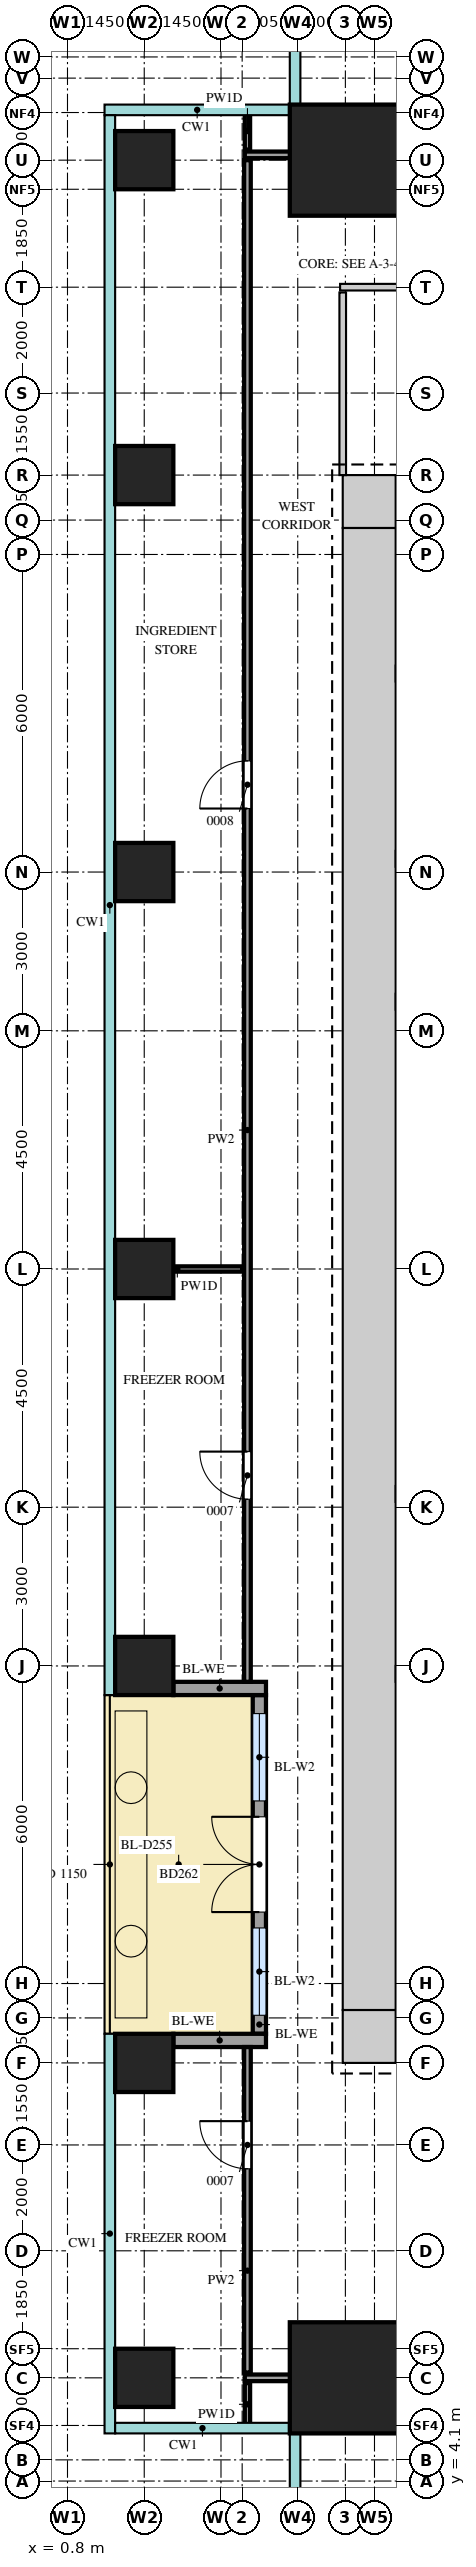
"""IFC4 building model, lengths in metres.
Left out: names, types, materials, properties, quantities, classifications, styles, units other than length and angle.
Written with IfcOpenShell. Run it as: python <this file> out.ifc"""

import sys

from ifc_helpers import new_model, si_unit, direction, frame, frame_2d, origin, origin_2d, place, context, subcontext, project, spatial, rectangle, extrude, source, transform, mapped, element, fill, save


model = new_model("IFC4")
c1 = context("Model", 3, precision=1e-05, world=origin(), true_north=direction((0.0, 1.0)))
c2 = subcontext(c1, "Body", "Model", "MODEL_VIEW")
j1 = project(units=[si_unit("LENGTHUNIT", "METRE"), si_unit("PLANEANGLEUNIT", "RADIAN")], contexts=[c1])
p1 = place(None, origin())
s1 = spatial("IfcSite", under=j1, at=p1, CompositionType="ELEMENT")
p2 = place(p1, origin())
s2 = spatial("IfcBuilding", under=s1, at=p2, CompositionType="ELEMENT")
p3 = place(p2, frame((0.0, 0.0, 123.5)))
s3 = spatial("IfcBuildingStorey", under=s2, at=p3, CompositionType="ELEMENT", Elevation=123.5)
m1 = source(origin(), c2, "Body", "SweptSolid", [
    extrude(rectangle(XDim=1.0, YDim=1.0, at=frame_2d((0.5, 0.0))), origin(), (0.0, 0.0, 1.0), 4.1),
])
for number, where, z_axis, x_axis in (
    (1, (6.0, 41.5, 0.0), (0.0, 0.0, 1.0), (1.0, 0.0, 0.0)),
    (2, (6.0, 12.5, 0.0), (0.0, 0.0, 1.0), (1.0, 0.0, 0.0)),
):
    element("IfcWall", number, at=place(p3, frame(where, z_axis=z_axis, x_axis=x_axis)), inside=s3, PredefinedType="SHEAR", context=c2, shape_type="MappedRepresentation", body=[
        mapped(m1, transform((0.0, 0.0, 0.0))),
    ])
m2 = source(origin(), c2, "Body", "SweptSolid", [
    extrude(rectangle(XDim=28.0, YDim=1.0, at=frame_2d((14.0, 0.0))), origin(), (0.0, 0.0, 1.0), 4.1),
])
p4 = place(p3, frame((6.5, 13.0, 0.0), z_axis=(0.0, 0.0, 1.0), x_axis=(0.0, 1.0, 0.0)))
e3 = element("IfcWall", 3, at=p4, inside=s3, PredefinedType="SHEAR", context=c2, shape_type="MappedRepresentation", body=[
    mapped(m2, transform((0.0, 0.0, 0.0))),
])
m3 = source(origin(), c2, "Body", "SweptSolid", [
    extrude(rectangle(XDim=2.1, YDim=2.1, at=origin_2d()), origin(), (0.0, 0.0, 1.0), 4.4),
])
for number, where, z_axis, x_axis in (
    (4, (6.05, 47.95, 0.0), (0.0, 0.0, 1.0), (1.0, 0.0, 0.0)),
    (5, (6.05, 6.05, 0.0), (0.0, 0.0, 1.0), (1.0, 0.0, 0.0)),
):
    element("IfcColumn", number, at=place(p3, frame(where, z_axis=z_axis, x_axis=x_axis)), inside=s3, PredefinedType="COLUMN", context=c2, shape_type="MappedRepresentation", body=[
        mapped(m3, transform((0.0, 0.0, 0.0))),
    ])
m4 = source(origin(), c2, "Body", "SweptSolid", [
    extrude(rectangle(XDim=1.1, YDim=1.1, at=origin_2d()), origin(), (0.0, 0.0, 1.0), 4.1),
])
for number, where, z_axis, x_axis in (
    (6, (2.25, 6.05, 0.0), (0.0, 0.0, 1.0), (1.0, 0.0, 0.0)),
    (7, (2.25, 12.0, 0.0), (0.0, 0.0, 1.0), (1.0, 0.0, 0.0)),
    (8, (2.25, 19.5, 0.0), (0.0, 0.0, 1.0), (1.0, 0.0, 0.0)),
    (9, (2.25, 27.0, 0.0), (0.0, 0.0, 1.0), (1.0, 0.0, 0.0)),
    (10, (2.25, 34.5, 0.0), (0.0, 0.0, 1.0), (1.0, 0.0, 0.0)),
    (11, (2.25, 42.0, 0.0), (0.0, 0.0, 1.0), (1.0, 0.0, 0.0)),
    (12, (2.25, 47.95, 0.0), (0.0, 0.0, 1.0), (1.0, 0.0, 0.0)),
):
    element("IfcColumn", number, at=place(p3, frame(where, z_axis=z_axis, x_axis=x_axis)), inside=s3, PredefinedType="COLUMN", context=c2, shape_type="MappedRepresentation", body=[
        mapped(m4, transform((0.0, 0.0, 0.0))),
    ])
m5 = source(origin(), c2, "Body", "SweptSolid", [
    extrude(rectangle(XDim=6.4, YDim=0.25, at=frame_2d((3.2, 0.0))), origin(), (0.0, 0.0, 1.0), 3.5),
])
p5 = place(p3, frame((4.425, 12.55, 0.0), z_axis=(0.0, 0.0, 1.0), x_axis=(0.0, 1.0, 0.0)))
e13 = element("IfcWall", 13, at=p5, inside=s3, PredefinedType="SOLIDWALL", context=c2, shape_type="MappedRepresentation", body=[
    mapped(m5, transform((0.0, 0.0, 0.0))),
])
m6 = source(origin(), c2, "Body", "SweptSolid", [
    extrude(rectangle(XDim=1.65, YDim=2.4, at=frame_2d((0.825, 1.2))), frame((0.0, 0.135, 0.0), z_axis=(0.0, -1.0, 0.0), x_axis=(1.0, 0.0, 0.0)), (0.0, 0.0, 1.0), 0.27),
])
p6 = place(p5, frame((0.35, 0.0, 0.0)))
e14 = element("IfcOpeningElement", 14, at=p6, cuts=e13, PredefinedType="OPENING", context=c2, shape_type="MappedRepresentation", body=[
    mapped(m6, transform((0.0, 0.0, 0.0))),
])
p7 = place(p5, frame((4.4, 0.0, 0.0)))
e15 = element("IfcOpeningElement", 15, at=p7, cuts=e13, PredefinedType="OPENING", context=c2, shape_type="MappedRepresentation", body=[
    mapped(m6, transform((0.0, 0.0, 0.0))),
])
m7 = source(origin(), c2, "Body", "SweptSolid", [
    extrude(rectangle(XDim=1.8, YDim=2.4, at=frame_2d((0.9, 1.2))), frame((0.0, 0.135, 0.0), z_axis=(0.0, -1.0, 0.0), x_axis=(1.0, 0.0, 0.0)), (0.0, 0.0, 1.0), 0.27),
])
p8 = place(p5, frame((2.3, 0.0, 0.0)))
e16 = element("IfcOpeningElement", 16, at=p8, cuts=e13, PredefinedType="OPENING", context=c2, shape_type="MappedRepresentation", body=[
    mapped(m7, transform((0.0, 0.0, 0.0))),
])
m8 = source(origin(), c2, "Body", "SweptSolid", [
    extrude(rectangle(XDim=1.75, YDim=0.25, at=frame_2d((0.875, 0.0))), origin(), (0.0, 0.0, 1.0), 3.5),
])
for number, where, z_axis, x_axis in (
    (17, (2.8, 12.425, 0.0), (0.0, 0.0, 1.0), (1.0, 0.0, 0.0)),
    (18, (2.8, 19.075, 0.0), (0.0, 0.0, 1.0), (1.0, 0.0, 0.0)),
):
    element("IfcWall", number, at=place(p3, frame(where, z_axis=z_axis, x_axis=x_axis)), inside=s3, PredefinedType="SOLIDWALL", context=c2, shape_type="MappedRepresentation", body=[
        mapped(m8, transform((0.0, 0.0, 0.0))),
    ])
m9 = source(origin(), c2, "Body", "SweptSolid", [
    extrude(rectangle(XDim=0.8, YDim=0.1, at=frame_2d((0.4, 0.0))), origin(), (0.0, 0.0, 1.0), 4.2),
])
p9 = place(p3, frame((4.2, 5.15, 0.0), z_axis=(0.0, 0.0, 1.0), x_axis=(0.0, 1.0, 0.0)))
e19 = element("IfcWall", 19, at=p9, inside=s3, PredefinedType="PARTITIONING", context=c2, shape_type="MappedRepresentation", body=[
    mapped(m9, transform((0.0, 0.0, 0.0))),
])
m10 = source(origin(), c2, "Body", "SweptSolid", [
    extrude(rectangle(XDim=22.3, YDim=0.125, at=frame_2d((11.15, 0.0))), origin(), (0.0, 0.0, 1.0), 3.55),
])
p10 = place(p3, frame((4.15, 6.05, 0.0), z_axis=(0.0, 0.0, 1.0), x_axis=(1.0, 0.0, 0.0)))
e20 = element("IfcWall", 20, at=p10, inside=s3, PredefinedType="PARTITIONING", context=c2, shape_type="MappedRepresentation", body=[
    mapped(m10, transform((0.0, 0.0, 0.0))),
])
m11 = source(origin(), c2, "Body", "SweptSolid", [
    extrude(rectangle(XDim=0.9, YDim=2.1, at=frame_2d((0.45, 1.05))), frame((0.0, 0.073, 0.0), z_axis=(0.0, -1.0, 0.0), x_axis=(1.0, 0.0, 0.0)), (0.0, 0.0, 1.0), 0.145),
])
p11 = place(p10, frame((7.25, 0.0, 0.0)))
e21 = element("IfcOpeningElement", 21, at=p11, cuts=e20, PredefinedType="OPENING", context=c2, shape_type="MappedRepresentation", body=[
    mapped(m11, transform((0.0, 0.0, 0.0))),
])
p12 = place(p10, frame((18.35, 0.0, 0.0)))
e22 = element("IfcOpeningElement", 22, at=p12, cuts=e20, PredefinedType="OPENING", context=c2, shape_type="MappedRepresentation", body=[
    mapped(m11, transform((0.0, 0.0, 0.0))),
])
m12 = source(origin(), c2, "Body", "SweptSolid", [
    extrude(rectangle(XDim=6.15, YDim=0.125, at=frame_2d((3.075, 0.0))), origin(), (0.0, 0.0, 1.0), 4.2),
])
p13 = place(p3, frame((4.2, 6.15, 0.0), z_axis=(0.0, 0.0, 1.0), x_axis=(0.0, 1.0, 0.0)))
e23 = element("IfcWall", 23, at=p13, inside=s3, PredefinedType="PARTITIONING", context=c2, shape_type="MappedRepresentation", body=[
    mapped(m12, transform((0.0, 0.0, 0.0))),
])
p14 = place(p13, frame((3.85, 0.0, 0.0)))
e24 = element("IfcOpeningElement", 24, at=p14, cuts=e23, PredefinedType="OPENING", context=c2, shape_type="MappedRepresentation", body=[
    mapped(m11, transform((0.0, 0.0, 0.0))),
])
m13 = source(origin(), c2, "Body", "SweptSolid", [
    extrude(rectangle(XDim=28.75, YDim=0.125, at=frame_2d((14.375, 0.0))), origin(), (0.0, 0.0, 1.0), 4.2),
])
p15 = place(p3, frame((4.2, 19.2, 0.0), z_axis=(0.0, 0.0, 1.0), x_axis=(0.0, 1.0, 0.0)))
e25 = element("IfcWall", 25, at=p15, inside=s3, PredefinedType="PARTITIONING", context=c2, shape_type="MappedRepresentation", body=[
    mapped(m13, transform((0.0, 0.0, 0.0))),
])
p16 = place(p15, frame((3.45, 0.0, 0.0)))
e26 = element("IfcOpeningElement", 26, at=p16, cuts=e25, PredefinedType="OPENING", context=c2, shape_type="MappedRepresentation", body=[
    mapped(m11, transform((0.0, 0.0, 0.0))),
])
p17 = place(p15, frame((16.5, 0.0, 0.0)))
e27 = element("IfcOpeningElement", 27, at=p17, cuts=e25, PredefinedType="OPENING", context=c2, shape_type="MappedRepresentation", body=[
    mapped(m11, transform((0.0, 0.0, 0.0))),
])
m14 = source(origin(), c2, "Body", "SweptSolid", [
    extrude(rectangle(XDim=2.45, YDim=0.1, at=frame_2d((1.225, 0.0))), origin(), (0.0, 0.0, 1.0), 4.2),
])
p18 = place(p3, frame((1.65, 27.0, 0.0), z_axis=(0.0, 0.0, 1.0), x_axis=(1.0, 0.0, 0.0)))
e28 = element("IfcWall", 28, at=p18, inside=s3, PredefinedType="PARTITIONING", context=c2, shape_type="MappedRepresentation", body=[
    mapped(m14, transform((0.0, 0.0, 0.0))),
])
m15 = source(origin(), c2, "Body", "SweptSolid", [
    extrude(rectangle(XDim=3.45, YDim=0.125, at=frame_2d((1.725, 0.0))), origin(), (0.0, 0.0, 1.0), 4.2),
])
p19 = place(p3, frame((6.0, 42.0, 0.0), z_axis=(0.0, 0.0, 1.0), x_axis=(0.0, 1.0, 0.0)))
e29 = element("IfcWall", 29, at=p19, inside=s3, PredefinedType="PARTITIONING", context=c2, shape_type="MappedRepresentation", body=[
    mapped(m15, transform((0.0, 0.0, 0.0))),
])
m16 = source(origin(), c2, "Body", "SweptSolid", [
    extrude(rectangle(XDim=7.95, YDim=0.125, at=frame_2d((3.975, 0.0))), origin(), (0.0, 0.0, 1.0), 4.2),
])
p20 = place(p3, frame((5.95, 45.55, 0.0), z_axis=(0.0, 0.0, 1.0), x_axis=(1.0, 0.0, 0.0)))
e30 = element("IfcWall", 30, at=p20, inside=s3, PredefinedType="PARTITIONING", context=c2, shape_type="MappedRepresentation", body=[
    mapped(m16, transform((0.0, 0.0, 0.0))),
])
p21 = place(p20, frame((1.55, 0.0, 0.0)))
e31 = element("IfcOpeningElement", 31, at=p21, cuts=e30, PredefinedType="OPENING", context=c2, shape_type="MappedRepresentation", body=[
    mapped(m11, transform((0.0, 0.0, 0.0))),
])
p22 = place(p20, frame((5.65, 0.0, 0.0)))
e32 = element("IfcOpeningElement", 32, at=p22, cuts=e30, PredefinedType="OPENING", context=c2, shape_type="MappedRepresentation", body=[
    mapped(m11, transform((0.0, 0.0, 0.0))),
])
m17 = source(origin(), c2, "Body", "SweptSolid", [
    extrude(rectangle(XDim=42.2, YDim=0.125, at=frame_2d((21.1, 0.0))), origin(), (0.0, 0.0, 1.0), 3.55),
])
p23 = place(p3, frame((4.15, 48.05, 0.0), z_axis=(0.0, 0.0, 1.0), x_axis=(1.0, 0.0, 0.0)))
e33 = element("IfcWall", 33, at=p23, inside=s3, PredefinedType="PARTITIONING", context=c2, shape_type="MappedRepresentation", body=[
    mapped(m17, transform((0.0, 0.0, 0.0))),
])
p24 = place(p23, frame((7.25, 0.0, 0.0)))
e34 = element("IfcOpeningElement", 34, at=p24, cuts=e33, PredefinedType="OPENING", context=c2, shape_type="MappedRepresentation", body=[
    mapped(m11, transform((0.0, 0.0, 0.0))),
])
p25 = place(p23, frame((22.55, 0.0, 0.0)))
e35 = element("IfcOpeningElement", 35, at=p25, cuts=e33, PredefinedType="OPENING", context=c2, shape_type="MappedRepresentation", body=[
    mapped(m11, transform((0.0, 0.0, 0.0))),
])
p26 = place(p23, frame((35.85, 0.0, 0.0)))
e36 = element("IfcOpeningElement", 36, at=p26, cuts=e33, PredefinedType="OPENING", context=c2, shape_type="MappedRepresentation", body=[
    mapped(m11, transform((0.0, 0.0, 0.0))),
])
m18 = source(origin(), c2, "Body", "SweptSolid", [
    extrude(rectangle(XDim=0.7, YDim=0.1, at=frame_2d((0.35, 0.0))), origin(), (0.0, 0.0, 1.0), 4.2),
])
p27 = place(p3, frame((4.2, 48.15, 0.0), z_axis=(0.0, 0.0, 1.0), x_axis=(0.0, 1.0, 0.0)))
e37 = element("IfcWall", 37, at=p27, inside=s3, PredefinedType="PARTITIONING", context=c2, shape_type="MappedRepresentation", body=[
    mapped(m18, transform((0.0, 0.0, 0.0))),
])
m19 = source(origin(), c2, "Body", "SweptSolid", [
    extrude(rectangle(XDim=1.65, YDim=2.4, at=frame_2d((0.825, 1.2))), frame((0.0, 0.03, 0.0), z_axis=(0.0, -1.0, 0.0), x_axis=(1.0, 0.0, 0.0)), (0.0, 0.0, 1.0), 0.06),
])
p28 = place(p6, origin())
e38 = element("IfcWindow", 38, at=p28, inside=s3, PartitioningType="SINGLE_PANEL", PredefinedType="WINDOW", context=c2, shape_type="MappedRepresentation", body=[
    mapped(m19, transform((0.0, 0.0, 0.0))),
])
fill(e14, e38)
p29 = place(p7, origin())
e39 = element("IfcWindow", 39, at=p29, inside=s3, PartitioningType="SINGLE_PANEL", PredefinedType="WINDOW", context=c2, shape_type="MappedRepresentation", body=[
    mapped(m19, transform((0.0, 0.0, 0.0))),
])
fill(e15, e39)
m20 = source(origin(), c2, "Body", "SweptSolid", [
    extrude(rectangle(XDim=1.8, YDim=2.4, at=frame_2d((0.9, 1.2))), frame((0.0, 0.025, 0.0), z_axis=(0.0, -1.0, 0.0), x_axis=(1.0, 0.0, 0.0)), (0.0, 0.0, 1.0), 0.05),
])
p30 = place(p8, origin())
e40 = element("IfcDoor", 40, at=p30, inside=s3, OperationType="DOUBLE_DOOR_DOUBLE_SWING", PredefinedType="DOOR", context=c2, shape_type="MappedRepresentation", body=[
    mapped(m20, transform((0.0, 0.0, 0.0))),
])
fill(e16, e40)
m21 = source(origin(), c2, "Body", "SweptSolid", [
    extrude(rectangle(XDim=0.9, YDim=2.1, at=frame_2d((0.45, 1.05))), frame((0.0, 0.025, 0.0), z_axis=(0.0, -1.0, 0.0), x_axis=(1.0, 0.0, 0.0)), (0.0, 0.0, 1.0), 0.05),
])
p31 = place(p14, origin())
e41 = element("IfcDoor", 41, at=p31, inside=s3, OperationType="SINGLE_SWING_LEFT", PredefinedType="DOOR", context=c2, shape_type="MappedRepresentation", body=[
    mapped(m21, transform((0.0, 0.0, 0.0))),
])
fill(e24, e41)
p32 = place(p16, origin())
e42 = element("IfcDoor", 42, at=p32, inside=s3, OperationType="SINGLE_SWING_LEFT", PredefinedType="DOOR", context=c2, shape_type="MappedRepresentation", body=[
    mapped(m21, transform((0.0, 0.0, 0.0))),
])
fill(e26, e42)
p33 = place(p17, origin())
e43 = element("IfcDoor", 43, at=p33, inside=s3, OperationType="SINGLE_SWING_RIGHT", PredefinedType="DOOR", context=c2, shape_type="MappedRepresentation", body=[
    mapped(m21, transform((0.0, 0.0, 0.0))),
])
fill(e27, e43)
save(model, sys.argv[1])
